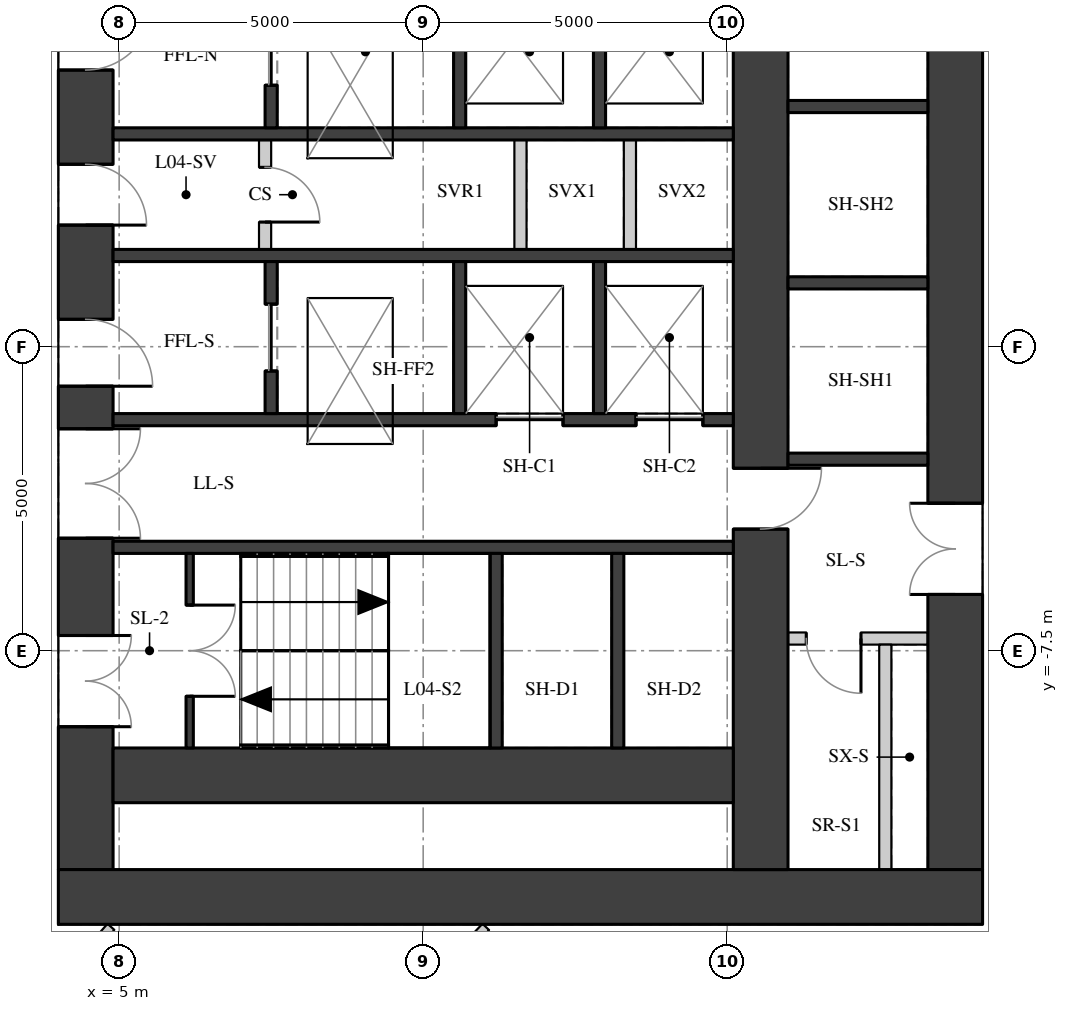
"""IFC4 building model, lengths in metres.
Left out: names, types, materials, properties, quantities, classifications, styles, units other than length and angle.
Written with IfcOpenShell. Run it as: python <this file> out.ifc"""

import sys

from ifc_helpers import new_model, si_unit, direction, frame, frame_2d, origin, place, context, subcontext, project, spatial, rectangle, extrude, element, fill, save


model = new_model("IFC4")
c1 = context("Model", 3, precision=1e-05, world=origin(), true_north=direction((0.0, 1.0)))
c2 = subcontext(c1, "Body", "Model", "MODEL_VIEW")
j1 = project(units=[si_unit("LENGTHUNIT", "METRE"), si_unit("PLANEANGLEUNIT", "RADIAN")], contexts=[c1])
p1 = place(None, origin())
s1 = spatial("IfcSite", under=j1, at=p1, CompositionType="ELEMENT")
p2 = place(p1, origin())
s2 = spatial("IfcBuilding", under=s1, at=p2, CompositionType="ELEMENT")
p3 = place(p2, frame((0.0, 0.0, 21.7)))
s3 = spatial("IfcBuildingStorey", under=s2, at=p3, CompositionType="ELEMENT", Elevation=21.7)
p4 = place(p3, frame((4.45, -11.1, 0.0), z_axis=(0.0, 0.0, 1.0), x_axis=(0.0, 1.0, 0.0)))
e1 = element("IfcWall", 1, at=p4, inside=s3, PredefinedType="SHEAR", context=c2, shape_type="SweptSolid", body=[
    extrude(rectangle(XDim=22.2, YDim=0.9, at=frame_2d((11.1, 0.0))), origin(), (0.0, 0.0, 1.0), 3.02),
])
p5 = place(p4, frame((2.35, 0.0, 0.0)))
e2 = element("IfcOpeningElement", 2, at=p5, cuts=e1, PredefinedType="OPENING", context=c2, shape_type="SweptSolid", body=[
    extrude(rectangle(XDim=1.5, YDim=2.1, at=frame_2d((0.75, 1.05))), frame((0.0, 0.46, 0.0), z_axis=(0.0, -1.0, 0.0), x_axis=(1.0, 0.0, 0.0)), (0.0, 0.0, 1.0), 0.92),
])
p6 = place(p4, frame((5.45, 0.0, 0.0)))
e3 = element("IfcOpeningElement", 3, at=p6, cuts=e1, PredefinedType="OPENING", context=c2, shape_type="SweptSolid", body=[
    extrude(rectangle(XDim=1.8, YDim=2.1, at=frame_2d((0.9, 1.05))), frame((0.0, 0.46, 0.0), z_axis=(0.0, -1.0, 0.0), x_axis=(1.0, 0.0, 0.0)), (0.0, 0.0, 1.0), 0.92),
])
p7 = place(p4, frame((7.95, 0.0, 0.0)))
e4 = element("IfcOpeningElement", 4, at=p7, cuts=e1, PredefinedType="OPENING", context=c2, shape_type="SweptSolid", body=[
    extrude(rectangle(XDim=1.1, YDim=2.1, at=frame_2d((0.55, 1.05))), frame((0.0, 0.46, 0.0), z_axis=(0.0, -1.0, 0.0), x_axis=(1.0, 0.0, 0.0)), (0.0, 0.0, 1.0), 0.92),
])
p8 = place(p4, frame((10.6, 0.0, 0.0)))
e5 = element("IfcOpeningElement", 5, at=p8, cuts=e1, PredefinedType="OPENING", context=c2, shape_type="SweptSolid", body=[
    extrude(rectangle(XDim=1.0, YDim=2.1, at=frame_2d((0.5, 1.05))), frame((0.0, 0.46, 0.0), z_axis=(0.0, -1.0, 0.0), x_axis=(1.0, 0.0, 0.0)), (0.0, 0.0, 1.0), 0.92),
])
p9 = place(p4, frame((13.15, 0.0, 0.0)))
e6 = element("IfcOpeningElement", 6, at=p9, cuts=e1, PredefinedType="OPENING", context=c2, shape_type="SweptSolid", body=[
    extrude(rectangle(XDim=1.1, YDim=2.1, at=frame_2d((0.55, 1.05))), frame((0.0, 0.46, 0.0), z_axis=(0.0, -1.0, 0.0), x_axis=(1.0, 0.0, 0.0)), (0.0, 0.0, 1.0), 0.92),
])
p10 = place(p4, frame((14.95, 0.0, 0.0)))
e7 = element("IfcOpeningElement", 7, at=p10, cuts=e1, PredefinedType="OPENING", context=c2, shape_type="SweptSolid", body=[
    extrude(rectangle(XDim=1.8, YDim=2.1, at=frame_2d((0.9, 1.05))), frame((0.0, 0.46, 0.0), z_axis=(0.0, -1.0, 0.0), x_axis=(1.0, 0.0, 0.0)), (0.0, 0.0, 1.0), 0.92),
])
p11 = place(p4, frame((18.35, 0.0, 0.0)))
e8 = element("IfcOpeningElement", 8, at=p11, cuts=e1, PredefinedType="OPENING", context=c2, shape_type="SweptSolid", body=[
    extrude(rectangle(XDim=1.5, YDim=2.1, at=frame_2d((0.75, 1.05))), frame((0.0, 0.46, 0.0), z_axis=(0.0, -1.0, 0.0), x_axis=(1.0, 0.0, 0.0)), (0.0, 0.0, 1.0), 0.92),
])
p12 = place(p3, frame((18.75, -11.1, 0.0), z_axis=(0.0, 0.0, 1.0), x_axis=(0.0, 1.0, 0.0)))
e9 = element("IfcWall", 9, at=p12, inside=s3, PredefinedType="SHEAR", context=c2, shape_type="SweptSolid", body=[
    extrude(rectangle(XDim=22.2, YDim=0.9, at=frame_2d((11.1, 0.0))), origin(), (0.0, 0.0, 1.0), 3.02),
])
p13 = place(p12, frame((15.925, 0.0, 0.0)))
e10 = element("IfcOpeningElement", 10, at=p13, cuts=e9, PredefinedType="OPENING", context=c2, shape_type="SweptSolid", body=[
    extrude(rectangle(XDim=1.5, YDim=2.1, at=frame_2d((0.75, 1.05))), frame((0.0, 0.46, 0.0), z_axis=(0.0, -1.0, 0.0), x_axis=(1.0, 0.0, 0.0)), (0.0, 0.0, 1.0), 0.92),
])
p14 = place(p12, frame((4.525, 0.0, 0.0)))
e11 = element("IfcOpeningElement", 11, at=p14, cuts=e9, PredefinedType="OPENING", context=c2, shape_type="SweptSolid", body=[
    extrude(rectangle(XDim=1.5, YDim=2.1, at=frame_2d((0.75, 1.05))), frame((0.0, 0.46, 0.0), z_axis=(0.0, -1.0, 0.0), x_axis=(1.0, 0.0, 0.0)), (0.0, 0.0, 1.0), 0.92),
])
p15 = place(p3, frame((4.0, -11.55, 0.0), z_axis=(0.0, 0.0, 1.0), x_axis=(1.0, 0.0, 0.0)))
e12 = element("IfcWall", 12, at=p15, inside=s3, PredefinedType="SHEAR", context=c2, shape_type="SweptSolid", body=[
    extrude(rectangle(XDim=15.2, YDim=0.9, at=frame_2d((7.6, 0.0))), origin(), (0.0, 0.0, 1.0), 3.02),
])
p16 = place(p3, frame((15.55, -11.1, 0.0), z_axis=(0.0, 0.0, 1.0), x_axis=(0.0, 1.0, 0.0)))
e13 = element("IfcWall", 13, at=p16, inside=s3, PredefinedType="SHEAR", context=c2, shape_type="SweptSolid", body=[
    extrude(rectangle(XDim=22.2, YDim=0.9, at=frame_2d((11.1, 0.0))), origin(), (0.0, 0.0, 1.0), 3.02),
])
p17 = place(p16, frame((15.6, 0.0, 0.0)))
e14 = element("IfcOpeningElement", 14, at=p17, cuts=e13, PredefinedType="OPENING", context=c2, shape_type="SweptSolid", body=[
    extrude(rectangle(XDim=1.0, YDim=2.1, at=frame_2d((0.5, 1.05))), frame((0.0, 0.46, 0.0), z_axis=(0.0, -1.0, 0.0), x_axis=(1.0, 0.0, 0.0)), (0.0, 0.0, 1.0), 0.92),
])
p18 = place(p16, frame((5.6, 0.0, 0.0)))
e15 = element("IfcOpeningElement", 15, at=p18, cuts=e13, PredefinedType="OPENING", context=c2, shape_type="SweptSolid", body=[
    extrude(rectangle(XDim=1.0, YDim=2.1, at=frame_2d((0.5, 1.05))), frame((0.0, 0.46, 0.0), z_axis=(0.0, -1.0, 0.0), x_axis=(1.0, 0.0, 0.0)), (0.0, 0.0, 1.0), 0.92),
])
p19 = place(p3, frame((4.9, -9.55, 0.0), z_axis=(0.0, 0.0, 1.0), x_axis=(1.0, 0.0, 0.0)))
e16 = element("IfcWall", 16, at=p19, inside=s3, PredefinedType="SHEAR", context=c2, shape_type="SweptSolid", body=[
    extrude(rectangle(XDim=10.2, YDim=0.9, at=frame_2d((5.1, 0.0))), origin(), (0.0, 0.0, 1.0), 3.02),
])
for number, where, z_axis, x_axis in (
    (17, (4.9, 1.0, 0.0), (0.0, 0.0, 1.0), (1.0, 0.0, 0.0)),
    (18, (4.9, -1.0, 0.0), (0.0, 0.0, 1.0), (1.0, 0.0, 0.0)),
):
    element("IfcWall", number, at=place(p3, frame(where, z_axis=z_axis, x_axis=x_axis)), inside=s3, PredefinedType="SHEAR", context=c2, shape_type="SweptSolid", body=[
        extrude(rectangle(XDim=10.2, YDim=0.2, at=frame_2d((5.1, 0.0))), origin(), (0.0, 0.0, 1.0), 3.02),
    ])
p20 = place(p3, frame((4.9, -3.7, 0.0), z_axis=(0.0, 0.0, 1.0), x_axis=(1.0, 0.0, 0.0)))
e19 = element("IfcWall", 19, at=p20, inside=s3, PredefinedType="SHEAR", context=c2, shape_type="SweptSolid", body=[
    extrude(rectangle(XDim=10.2, YDim=0.2, at=frame_2d((5.1, 0.0))), origin(), (0.0, 0.0, 1.0), 3.02),
])
p21 = place(p20, frame((6.3, 0.0, 0.0)))
e20 = element("IfcOpeningElement", 20, at=p21, cuts=e19, PredefinedType="OPENING", context=c2, shape_type="SweptSolid", body=[
    extrude(rectangle(XDim=1.1, YDim=2.1, at=frame_2d((0.55, 1.05))), frame((0.0, 0.11, 0.0), z_axis=(0.0, -1.0, 0.0), x_axis=(1.0, 0.0, 0.0)), (0.0, 0.0, 1.0), 0.22),
])
p22 = place(p20, frame((8.6, 0.0, 0.0)))
e21 = element("IfcOpeningElement", 21, at=p22, cuts=e19, PredefinedType="OPENING", context=c2, shape_type="SweptSolid", body=[
    extrude(rectangle(XDim=1.1, YDim=2.1, at=frame_2d((0.55, 1.05))), frame((0.0, 0.11, 0.0), z_axis=(0.0, -1.0, 0.0), x_axis=(1.0, 0.0, 0.0)), (0.0, 0.0, 1.0), 0.22),
])
p23 = place(p3, frame((4.9, -5.8, 0.0), z_axis=(0.0, 0.0, 1.0), x_axis=(1.0, 0.0, 0.0)))
e22 = element("IfcWall", 22, at=p23, inside=s3, PredefinedType="SHEAR", context=c2, shape_type="SweptSolid", body=[
    extrude(rectangle(XDim=10.2, YDim=0.2, at=frame_2d((5.1, 0.0))), origin(), (0.0, 0.0, 1.0), 3.02),
])
for number, where, z_axis, x_axis in (
    (23, (11.2, -9.1, 0.0), (0.0, 0.0, 1.0), (0.0, 1.0, 0.0)),
    (24, (13.2, -9.1, 0.0), (0.0, 0.0, 1.0), (0.0, 1.0, 0.0)),
):
    element("IfcWall", number, at=place(p3, frame(where, z_axis=z_axis, x_axis=x_axis)), inside=s3, PredefinedType="SHEAR", context=c2, shape_type="SweptSolid", body=[
        extrude(rectangle(XDim=3.2, YDim=0.2, at=frame_2d((1.6, 0.0))), origin(), (0.0, 0.0, 1.0), 3.02),
    ])
p24 = place(p3, frame((7.5, 1.1, 0.0), z_axis=(0.0, 0.0, 1.0), x_axis=(0.0, 1.0, 0.0)))
e25 = element("IfcWall", 25, at=p24, inside=s3, PredefinedType="SHEAR", context=c2, shape_type="SweptSolid", body=[
    extrude(rectangle(XDim=2.5, YDim=0.2, at=frame_2d((1.25, 0.0))), origin(), (0.0, 0.0, 1.0), 3.02),
])
p25 = place(p24, frame((0.7, 0.0, 0.0)))
e26 = element("IfcOpeningElement", 26, at=p25, cuts=e25, PredefinedType="OPENING", context=c2, shape_type="SweptSolid", body=[
    extrude(rectangle(XDim=1.1, YDim=2.1, at=frame_2d((0.55, 1.05))), frame((0.0, 0.11, 0.0), z_axis=(0.0, -1.0, 0.0), x_axis=(1.0, 0.0, 0.0)), (0.0, 0.0, 1.0), 0.22),
])
p26 = place(p3, frame((7.5, -3.6, 0.0), z_axis=(0.0, 0.0, 1.0), x_axis=(0.0, 1.0, 0.0)))
e27 = element("IfcWall", 27, at=p26, inside=s3, PredefinedType="SHEAR", context=c2, shape_type="SweptSolid", body=[
    extrude(rectangle(XDim=2.5, YDim=0.2, at=frame_2d((1.25, 0.0))), origin(), (0.0, 0.0, 1.0), 3.02),
])
p27 = place(p26, frame((0.7, 0.0, 0.0)))
e28 = element("IfcOpeningElement", 28, at=p27, cuts=e27, PredefinedType="OPENING", context=c2, shape_type="SweptSolid", body=[
    extrude(rectangle(XDim=1.1, YDim=2.1, at=frame_2d((0.55, 1.05))), frame((0.0, 0.11, 0.0), z_axis=(0.0, -1.0, 0.0), x_axis=(1.0, 0.0, 0.0)), (0.0, 0.0, 1.0), 0.22),
])
for number, where, z_axis, x_axis in (
    (29, (10.6, 1.1, 0.0), (0.0, 0.0, 1.0), (0.0, 1.0, 0.0)),
    (30, (10.6, -3.6, 0.0), (0.0, 0.0, 1.0), (0.0, 1.0, 0.0)),
    (31, (12.9, 1.1, 0.0), (0.0, 0.0, 1.0), (0.0, 1.0, 0.0)),
    (32, (12.9, -3.6, 0.0), (0.0, 0.0, 1.0), (0.0, 1.0, 0.0)),
):
    element("IfcWall", number, at=place(p3, frame(where, z_axis=z_axis, x_axis=x_axis)), inside=s3, PredefinedType="SHEAR", context=c2, shape_type="SweptSolid", body=[
        extrude(rectangle(XDim=2.5, YDim=0.2, at=frame_2d((1.25, 0.0))), origin(), (0.0, 0.0, 1.0), 3.02),
    ])
p28 = place(p3, frame((6.16, -9.1, 0.0), z_axis=(0.0, 0.0, 1.0), x_axis=(0.0, 1.0, 0.0)))
e33 = element("IfcWall", 33, at=p28, inside=s3, PredefinedType="SHEAR", context=c2, shape_type="SweptSolid", body=[
    extrude(rectangle(XDim=3.2, YDim=0.12, at=frame_2d((1.6, 0.0))), origin(), (0.0, 0.0, 1.0), 3.02),
])
p29 = place(p28, frame((0.85, 0.0, 0.0)))
e34 = element("IfcOpeningElement", 34, at=p29, cuts=e33, PredefinedType="OPENING", context=c2, shape_type="SweptSolid", body=[
    extrude(rectangle(XDim=1.5, YDim=2.1, at=frame_2d((0.75, 1.05))), frame((0.0, 0.07, 0.0), z_axis=(0.0, -1.0, 0.0), x_axis=(1.0, 0.0, 0.0)), (0.0, 0.0, 1.0), 0.14),
])
p30 = place(p3, frame((7.4, -0.9, 0.0), z_axis=(0.0, 0.0, 1.0), x_axis=(0.0, 1.0, 0.0)))
e35 = element("IfcWall", 35, at=p30, inside=s3, PredefinedType="PARTITIONING", context=c2, shape_type="SweptSolid", body=[
    extrude(rectangle(XDim=1.8, YDim=0.2, at=frame_2d((0.9, 0.0))), origin(), (0.0, 0.0, 1.0), 3.02),
])
p31 = place(p30, frame((0.45, 0.0, 0.0)))
e36 = element("IfcOpeningElement", 36, at=p31, cuts=e35, PredefinedType="OPENING", context=c2, shape_type="SweptSolid", body=[
    extrude(rectangle(XDim=0.9, YDim=2.1, at=frame_2d((0.45, 1.05))), frame((0.0, 0.11, 0.0), z_axis=(0.0, -1.0, 0.0), x_axis=(1.0, 0.0, 0.0)), (0.0, 0.0, 1.0), 0.22),
])
for number, where, z_axis, x_axis in (
    (37, (11.6, -0.9, 0.0), (0.0, 0.0, 1.0), (0.0, 1.0, 0.0)),
    (38, (13.4, -0.9, 0.0), (0.0, 0.0, 1.0), (0.0, 1.0, 0.0)),
):
    element("IfcWall", number, at=place(p3, frame(where, z_axis=z_axis, x_axis=x_axis)), inside=s3, PredefinedType="PARTITIONING", context=c2, shape_type="SweptSolid", body=[
        extrude(rectangle(XDim=1.8, YDim=0.2, at=frame_2d((0.9, 0.0))), origin(), (0.0, 0.0, 1.0), 3.02),
    ])
for number, where, z_axis, x_axis in (
    (39, (16.0, -4.35, 0.0), (0.0, 0.0, 1.0), (1.0, 0.0, 0.0)),
    (40, (16.0, -1.45, 0.0), (0.0, 0.0, 1.0), (1.0, 0.0, 0.0)),
    (41, (16.0, 1.45, 0.0), (0.0, 0.0, 1.0), (1.0, 0.0, 0.0)),
):
    element("IfcWall", number, at=place(p3, frame(where, z_axis=z_axis, x_axis=x_axis)), inside=s3, PredefinedType="SHEAR", context=c2, shape_type="SweptSolid", body=[
        extrude(rectangle(XDim=2.3, YDim=0.2, at=frame_2d((1.15, 0.0))), origin(), (0.0, 0.0, 1.0), 3.02),
    ])
p32 = place(p3, frame((16.0, -7.3, 0.0), z_axis=(0.0, 0.0, 1.0), x_axis=(1.0, 0.0, 0.0)))
e42 = element("IfcWall", 42, at=p32, inside=s3, PredefinedType="PARTITIONING", context=c2, shape_type="SweptSolid", body=[
    extrude(rectangle(XDim=2.3, YDim=0.2, at=frame_2d((1.15, 0.0))), origin(), (0.0, 0.0, 1.0), 3.02),
])
p33 = place(p32, frame((0.3, 0.0, 0.0)))
e43 = element("IfcOpeningElement", 43, at=p33, cuts=e42, PredefinedType="OPENING", context=c2, shape_type="SweptSolid", body=[
    extrude(rectangle(XDim=0.9, YDim=2.1, at=frame_2d((0.45, 1.05))), frame((0.0, 0.11, 0.0), z_axis=(0.0, -1.0, 0.0), x_axis=(1.0, 0.0, 0.0)), (0.0, 0.0, 1.0), 0.22),
])
p34 = place(p3, frame((17.6, -11.1, 0.0), z_axis=(0.0, 0.0, 1.0), x_axis=(0.0, 1.0, 0.0)))
e44 = element("IfcWall", 44, at=p34, inside=s3, PredefinedType="PARTITIONING", context=c2, shape_type="SweptSolid", body=[
    extrude(rectangle(XDim=3.7, YDim=0.2, at=frame_2d((1.85, 0.0))), origin(), (0.0, 0.0, 1.0), 3.02),
])
p35 = place(p3, frame((11.03, -12.043, 0.0), z_axis=(0.0, 0.0, 1.0), x_axis=(-0.687734044261, -0.725962729322, 0.0)))
e45 = element("IfcWall", 45, at=p35, inside=s3, PredefinedType="PARTITIONING", context=c2, shape_type="SweptSolid", body=[
    extrude(rectangle(XDim=1.916, YDim=0.15, at=frame_2d((0.958, 0.0))), origin(), (0.0, 0.0, 1.0), 3.02),
])
p36 = place(p3, frame((4.353, -12.623, 0.0), z_axis=(0.0, 0.0, 1.0), x_axis=(0.660265480509, 0.751032286422, 0.0)))
e46 = element("IfcWall", 46, at=p36, inside=s3, PredefinedType="PARTITIONING", context=c2, shape_type="SweptSolid", body=[
    extrude(rectangle(XDim=0.775, YDim=0.15, at=frame_2d((0.387, 0.0))), origin(), (0.0, 0.0, 1.0), 2.57),
])
p37 = place(p5, origin())
e47 = element("IfcDoor", 47, at=p37, inside=s3, OperationType="DOUBLE_DOOR_SINGLE_SWING", PredefinedType="DOOR", context=c2, shape_type="SweptSolid", body=[
    extrude(rectangle(XDim=1.5, YDim=2.1, at=frame_2d((0.75, 1.05))), frame((0.0, 0.025, 0.0), z_axis=(0.0, -1.0, 0.0), x_axis=(1.0, 0.0, 0.0)), (0.0, 0.0, 1.0), 0.05),
])
fill(e2, e47)
p38 = place(p6, origin())
e48 = element("IfcDoor", 48, at=p38, inside=s3, OperationType="DOUBLE_DOOR_SINGLE_SWING", PredefinedType="DOOR", context=c2, shape_type="SweptSolid", body=[
    extrude(rectangle(XDim=1.8, YDim=2.1, at=frame_2d((0.9, 1.05))), frame((0.0, 0.025, 0.0), z_axis=(0.0, -1.0, 0.0), x_axis=(1.0, 0.0, 0.0)), (0.0, 0.0, 1.0), 0.05),
])
fill(e3, e48)
p39 = place(p7, origin())
e49 = element("IfcDoor", 49, at=p39, inside=s3, OperationType="SINGLE_SWING_RIGHT", PredefinedType="DOOR", context=c2, shape_type="SweptSolid", body=[
    extrude(rectangle(XDim=1.1, YDim=2.1, at=frame_2d((0.55, 1.05))), frame((0.0, 0.025, 0.0), z_axis=(0.0, -1.0, 0.0), x_axis=(1.0, 0.0, 0.0)), (0.0, 0.0, 1.0), 0.05),
])
fill(e4, e49)
p40 = place(p8, origin())
e50 = element("IfcDoor", 50, at=p40, inside=s3, OperationType="SINGLE_SWING_RIGHT", PredefinedType="DOOR", context=c2, shape_type="SweptSolid", body=[
    extrude(rectangle(XDim=1.0, YDim=2.1, at=frame_2d((0.5, 1.05))), frame((0.0, 0.025, 0.0), z_axis=(0.0, -1.0, 0.0), x_axis=(1.0, 0.0, 0.0)), (0.0, 0.0, 1.0), 0.05),
])
fill(e5, e50)
p41 = place(p9, origin())
e51 = element("IfcDoor", 51, at=p41, inside=s3, OperationType="SINGLE_SWING_LEFT", PredefinedType="DOOR", context=c2, shape_type="SweptSolid", body=[
    extrude(rectangle(XDim=1.1, YDim=2.1, at=frame_2d((0.55, 1.05))), frame((0.0, 0.025, 0.0), z_axis=(0.0, -1.0, 0.0), x_axis=(1.0, 0.0, 0.0)), (0.0, 0.0, 1.0), 0.05),
])
fill(e6, e51)
p42 = place(p14, origin())
e52 = element("IfcDoor", 52, at=p42, inside=s3, OperationType="DOUBLE_DOOR_SINGLE_SWING", PredefinedType="DOOR", context=c2, shape_type="SweptSolid", body=[
    extrude(rectangle(XDim=1.5, YDim=2.1, at=frame_2d((0.75, 1.05))), frame((0.0, 0.025, 0.0), z_axis=(0.0, -1.0, 0.0), x_axis=(1.0, 0.0, 0.0)), (0.0, 0.0, 1.0), 0.05),
])
fill(e11, e52)
p43 = place(p29, origin())
e53 = element("IfcDoor", 53, at=p43, inside=s3, OperationType="DOUBLE_DOOR_SINGLE_SWING", PredefinedType="DOOR", context=c2, shape_type="SweptSolid", body=[
    extrude(rectangle(XDim=1.5, YDim=2.1, at=frame_2d((0.75, 1.05))), frame((0.0, 0.025, 0.0), z_axis=(0.0, -1.0, 0.0), x_axis=(1.0, 0.0, 0.0)), (0.0, 0.0, 1.0), 0.05),
])
fill(e34, e53)
p44 = place(p21, origin())
e54 = element("IfcDoor", 54, at=p44, inside=s3, OperationType="DOUBLE_DOOR_SLIDING", PredefinedType="DOOR", context=c2, shape_type="SweptSolid", body=[
    extrude(rectangle(XDim=1.1, YDim=2.1, at=frame_2d((0.55, 1.05))), frame((0.0, 0.025, 0.0), z_axis=(0.0, -1.0, 0.0), x_axis=(1.0, 0.0, 0.0)), (0.0, 0.0, 1.0), 0.05),
])
fill(e20, e54)
p45 = place(p22, origin())
e55 = element("IfcDoor", 55, at=p45, inside=s3, OperationType="DOUBLE_DOOR_SLIDING", PredefinedType="DOOR", context=c2, shape_type="SweptSolid", body=[
    extrude(rectangle(XDim=1.1, YDim=2.1, at=frame_2d((0.55, 1.05))), frame((0.0, 0.025, 0.0), z_axis=(0.0, -1.0, 0.0), x_axis=(1.0, 0.0, 0.0)), (0.0, 0.0, 1.0), 0.05),
])
fill(e21, e55)
p46 = place(p25, origin())
e56 = element("IfcDoor", 56, at=p46, inside=s3, OperationType="DOUBLE_DOOR_SLIDING", PredefinedType="DOOR", context=c2, shape_type="SweptSolid", body=[
    extrude(rectangle(XDim=1.1, YDim=2.1, at=frame_2d((0.55, 1.05))), frame((0.0, 0.025, 0.0), z_axis=(0.0, -1.0, 0.0), x_axis=(1.0, 0.0, 0.0)), (0.0, 0.0, 1.0), 0.05),
])
fill(e26, e56)
p47 = place(p27, origin())
e57 = element("IfcDoor", 57, at=p47, inside=s3, OperationType="DOUBLE_DOOR_SLIDING", PredefinedType="DOOR", context=c2, shape_type="SweptSolid", body=[
    extrude(rectangle(XDim=1.1, YDim=2.1, at=frame_2d((0.55, 1.05))), frame((0.0, 0.025, 0.0), z_axis=(0.0, -1.0, 0.0), x_axis=(1.0, 0.0, 0.0)), (0.0, 0.0, 1.0), 0.05),
])
fill(e28, e57)
p48 = place(p31, origin())
e58 = element("IfcDoor", 58, at=p48, inside=s3, OperationType="SINGLE_SWING_RIGHT", PredefinedType="DOOR", context=c2, shape_type="SweptSolid", body=[
    extrude(rectangle(XDim=0.9, YDim=2.1, at=frame_2d((0.45, 1.05))), frame((0.0, 0.025, 0.0), z_axis=(0.0, -1.0, 0.0), x_axis=(1.0, 0.0, 0.0)), (0.0, 0.0, 1.0), 0.05),
])
fill(e36, e58)
p49 = place(p18, origin())
e59 = element("IfcDoor", 59, at=p49, inside=s3, OperationType="SINGLE_SWING_LEFT", PredefinedType="DOOR", context=c2, shape_type="SweptSolid", body=[
    extrude(rectangle(XDim=1.0, YDim=2.1, at=frame_2d((0.5, 1.05))), frame((0.0, 0.025, 0.0), z_axis=(0.0, -1.0, 0.0), x_axis=(1.0, 0.0, 0.0)), (0.0, 0.0, 1.0), 0.05),
])
fill(e15, e59)
p50 = place(p33, origin())
e60 = element("IfcDoor", 60, at=p50, inside=s3, OperationType="SINGLE_SWING_LEFT", PredefinedType="DOOR", context=c2, shape_type="SweptSolid", body=[
    extrude(rectangle(XDim=0.9, YDim=2.1, at=frame_2d((0.45, 1.05))), frame((0.0, 0.025, 0.0), z_axis=(0.0, -1.0, 0.0), x_axis=(1.0, 0.0, 0.0)), (0.0, 0.0, 1.0), 0.05),
])
fill(e43, e60)
save(model, sys.argv[1])
